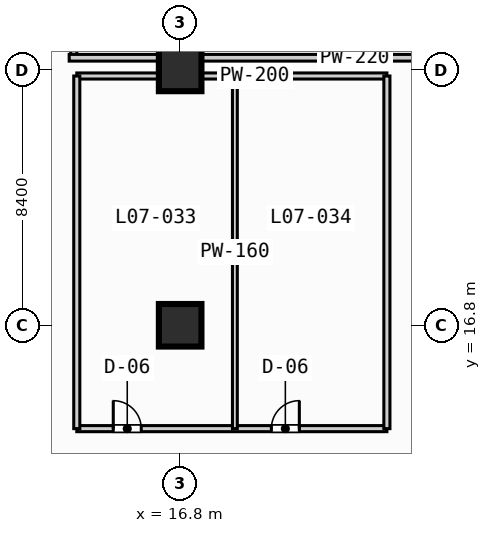
"""IFC4 building model, lengths in metres.
Left out: names, types, materials, properties, quantities, classifications, styles, units other than length and angle.
Written with IfcOpenShell. Run it as: python <this file> out.ifc"""

import sys

from ifc_helpers import new_model, si_unit, direction, frame, frame_2d, origin, origin_2d, place, context, subcontext, project, spatial, rectangle, extrude, element, fill, save


model = new_model("IFC4")
c1 = context("Model", 3, precision=1e-05, world=origin(), true_north=direction((0.0, 1.0)))
c2 = subcontext(c1, "Body", "Model", "MODEL_VIEW")
j1 = project(units=[si_unit("LENGTHUNIT", "METRE"), si_unit("PLANEANGLEUNIT", "RADIAN")], contexts=[c1])
p1 = place(None, origin())
s1 = spatial("IfcSite", under=j1, at=p1, CompositionType="ELEMENT")
p2 = place(p1, origin())
s2 = spatial("IfcBuilding", under=s1, at=p2, CompositionType="ELEMENT")
p3 = place(p2, frame((0.0, 0.0, 35.8)))
s3 = spatial("IfcBuildingStorey", under=s2, at=p3, CompositionType="ELEMENT", Elevation=35.8)
for number, where, z_axis, x_axis in (
    (1, (16.8, 16.8, 0.0), (0.0, 0.0, 1.0), (1.0, 0.0, 0.0)),
    (2, (16.8, 25.2, 0.0), (0.0, 0.0, 1.0), (1.0, 0.0, 0.0)),
):
    element("IfcColumn", number, at=place(p3, frame(where, z_axis=z_axis, x_axis=x_axis)), inside=s3, PredefinedType="COLUMN", context=c2, shape_type="SweptSolid", body=[
        extrude(rectangle(XDim=1.4, YDim=1.4, at=origin_2d()), origin(), (0.0, 0.0, 1.0), 3.8),
    ])
p4 = place(p3, frame((13.4, 13.4, 0.0), z_axis=(0.0, 0.0, 1.0), x_axis=(1.0, 0.0, 0.0)))
e3 = element("IfcWall", 3, at=p4, inside=s3, PredefinedType="PARTITIONING", context=c2, shape_type="SweptSolid", body=[
    extrude(rectangle(XDim=10.2, YDim=0.2, at=frame_2d((5.1, 0.0))), origin(), (0.0, 0.0, 1.0), 3.55),
])
p5 = place(p4, frame((1.2, 0.0, 0.0)))
e4 = element("IfcOpeningElement", 4, at=p5, cuts=e3, PredefinedType="OPENING", context=c2, shape_type="SweptSolid", body=[
    extrude(rectangle(XDim=0.92, YDim=2.1, at=frame_2d((0.46, 1.05))), frame((0.0, 0.11, 0.0), z_axis=(0.0, -1.0, 0.0), x_axis=(1.0, 0.0, 0.0)), (0.0, 0.0, 1.0), 0.22),
])
p6 = place(p4, frame((6.4, 0.0, 0.0)))
e5 = element("IfcOpeningElement", 5, at=p6, cuts=e3, PredefinedType="OPENING", context=c2, shape_type="SweptSolid", body=[
    extrude(rectangle(XDim=0.92, YDim=2.1, at=frame_2d((0.46, 1.05))), frame((0.0, 0.11, 0.0), z_axis=(0.0, -1.0, 0.0), x_axis=(1.0, 0.0, 0.0)), (0.0, 0.0, 1.0), 0.22),
])
p7 = place(p3, frame((18.6, 13.4, 0.0), z_axis=(0.0, 0.0, 1.0), x_axis=(0.0, 1.0, 0.0)))
e6 = element("IfcWall", 6, at=p7, inside=s3, PredefinedType="PARTITIONING", context=c2, shape_type="SweptSolid", body=[
    extrude(rectangle(XDim=11.6, YDim=0.16, at=frame_2d((5.8, 0.0))), origin(), (0.0, 0.0, 1.0), 3.55),
])
p8 = place(p3, frame((13.4, 25.0, 0.0), z_axis=(0.0, 0.0, 1.0), x_axis=(1.0, 0.0, 0.0)))
e7 = element("IfcWall", 7, at=p8, inside=s3, PredefinedType="PARTITIONING", context=c2, shape_type="SweptSolid", body=[
    extrude(rectangle(XDim=10.2, YDim=0.2, at=frame_2d((5.1, 0.0))), origin(), (0.0, 0.0, 1.0), 2.8),
])
for number, where, z_axis, x_axis in (
    (8, (13.4, 13.4, 0.0), (0.0, 0.0, 1.0), (0.0, 1.0, 0.0)),
    (9, (23.6, 13.4, 0.0), (0.0, 0.0, 1.0), (0.0, 1.0, 0.0)),
):
    element("IfcWall", number, at=place(p3, frame(where, z_axis=z_axis, x_axis=x_axis)), inside=s3, PredefinedType="PARTITIONING", context=c2, shape_type="SweptSolid", body=[
        extrude(rectangle(XDim=11.6, YDim=0.2, at=frame_2d((5.8, 0.0))), origin(), (0.0, 0.0, 1.0), 3.55),
    ])
p9 = place(p3, frame((13.3, 25.6, 0.0), z_axis=(0.0, 0.0, 1.0), x_axis=(0.0, 1.0, 0.0)))
e10 = element("IfcWall", 10, at=p9, inside=s3, PredefinedType="PARTITIONING", context=c2, shape_type="SweptSolid", body=[
    extrude(rectangle(XDim=13.6, YDim=0.2, at=frame_2d((6.8, 0.0))), origin(), (0.0, 0.0, 1.0), 3.55),
])
p10 = place(p9, frame((1.735, 0.0, 0.0)))
e11 = element("IfcOpeningElement", 11, at=p10, cuts=e10, PredefinedType="OPENING", context=c2, shape_type="SweptSolid", body=[
    extrude(rectangle(XDim=1.0, YDim=2.15, at=frame_2d((0.5, 1.075))), frame((0.0, 0.11, 0.0), z_axis=(0.0, -1.0, 0.0), x_axis=(1.0, 0.0, 0.0)), (0.0, 0.0, 1.0), 0.22),
])
p11 = place(p9, frame((8.535, 0.0, 0.0)))
e12 = element("IfcOpeningElement", 12, at=p11, cuts=e10, PredefinedType="OPENING", context=c2, shape_type="SweptSolid", body=[
    extrude(rectangle(XDim=1.0, YDim=2.15, at=frame_2d((0.5, 1.075))), frame((0.0, 0.11, 0.0), z_axis=(0.0, -1.0, 0.0), x_axis=(1.0, 0.0, 0.0)), (0.0, 0.0, 1.0), 0.22),
])
p12 = place(p3, frame((13.15, 25.6, 0.0), z_axis=(0.0, 0.0, 1.0), x_axis=(1.0, 0.0, 0.0)))
e13 = element("IfcWall", 13, at=p12, inside=s3, PredefinedType="PARTITIONING", context=c2, shape_type="SweptSolid", body=[
    extrude(rectangle(XDim=20.28, YDim=0.22, at=frame_2d((10.14, 0.0))), origin(), (0.0, 0.0, 1.0), 3.55),
])
p13 = place(p5, origin())
e14 = element("IfcDoor", 14, at=p13, inside=s3, OperationType="SINGLE_SWING_LEFT", PredefinedType="DOOR", context=c2, shape_type="SweptSolid", body=[
    extrude(rectangle(XDim=0.92, YDim=2.1, at=frame_2d((0.46, 1.05))), frame((0.0, 0.025, 0.0), z_axis=(0.0, -1.0, 0.0), x_axis=(1.0, 0.0, 0.0)), (0.0, 0.0, 1.0), 0.05),
])
fill(e4, e14)
p14 = place(p6, origin())
e15 = element("IfcDoor", 15, at=p14, inside=s3, OperationType="SINGLE_SWING_RIGHT", PredefinedType="DOOR", context=c2, shape_type="SweptSolid", body=[
    extrude(rectangle(XDim=0.92, YDim=2.1, at=frame_2d((0.46, 1.05))), frame((0.0, 0.025, 0.0), z_axis=(0.0, -1.0, 0.0), x_axis=(1.0, 0.0, 0.0)), (0.0, 0.0, 1.0), 0.05),
])
fill(e5, e15)
save(model, sys.argv[1])
